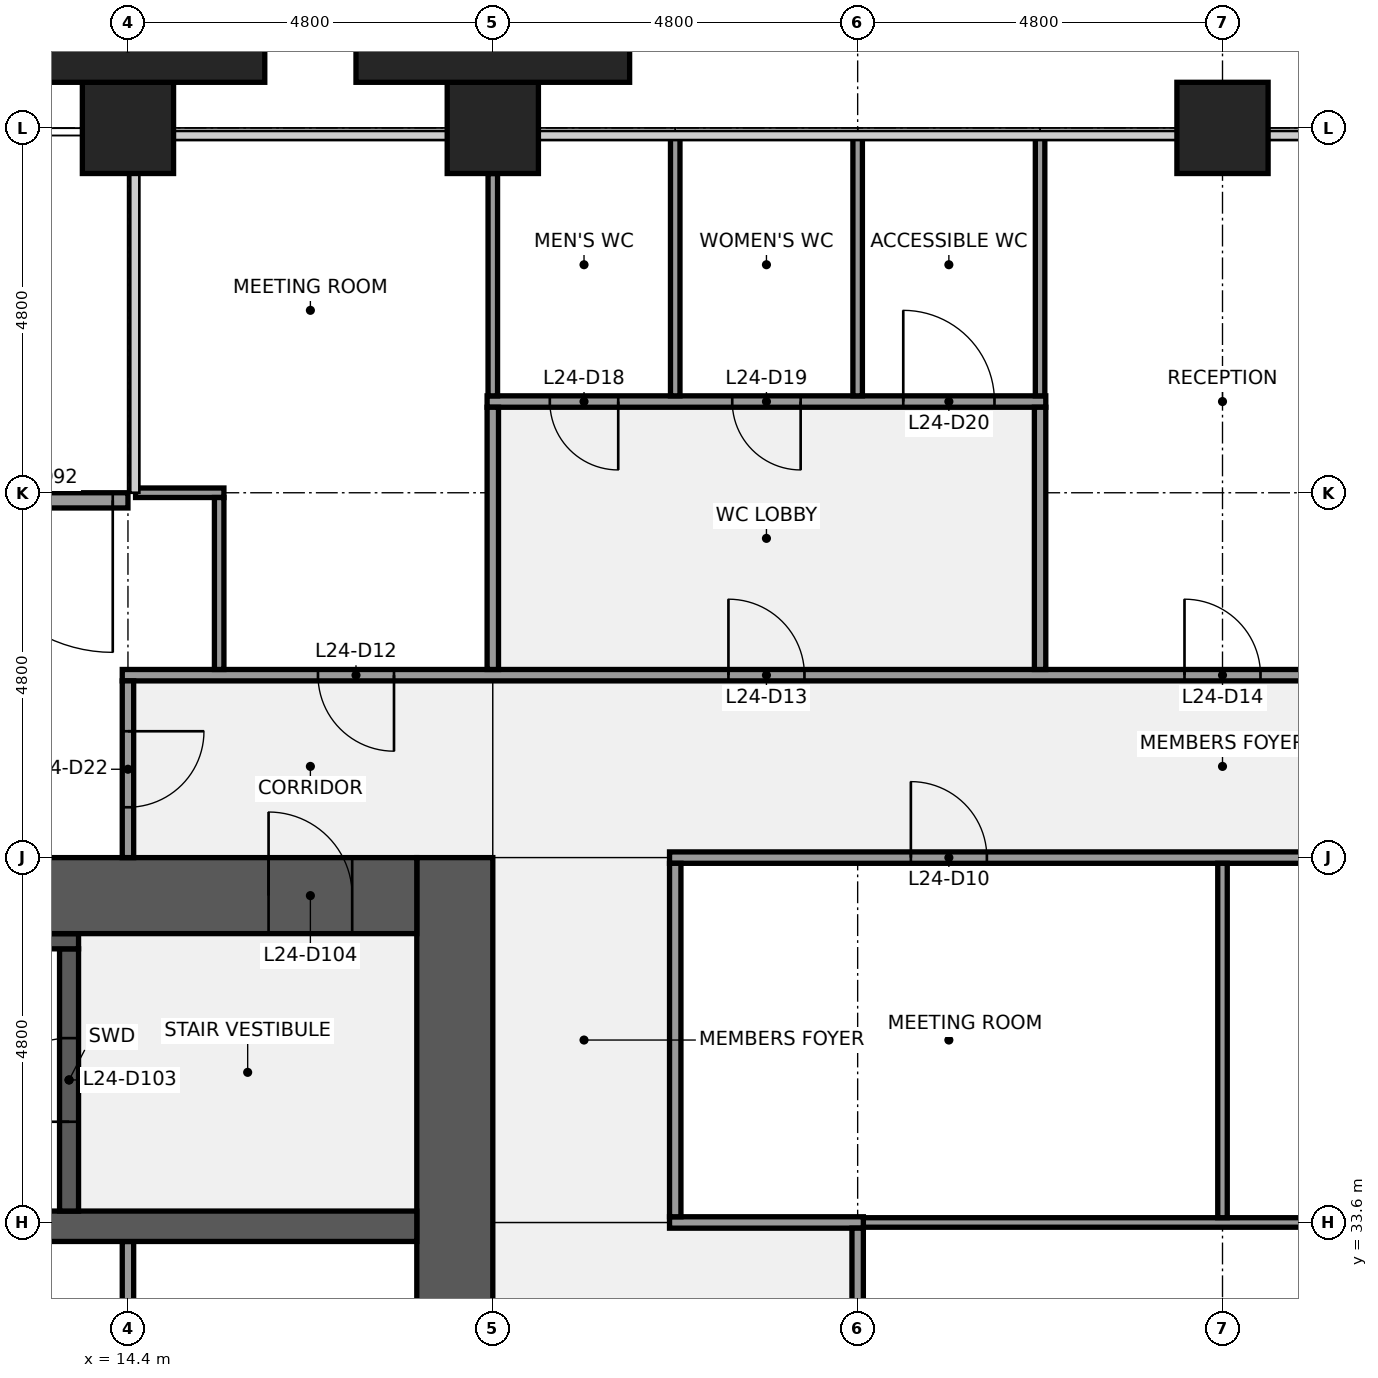
"""IFC4 building model, lengths in metres.
Left out: names, types, materials, properties, quantities, classifications, styles, units other than length and angle.
Written with IfcOpenShell. Run it as: python <this file> out.ifc"""

import sys

from ifc_helpers import new_model, si_unit, direction, frame, frame_2d, origin, origin_2d, place, context, subcontext, project, spatial, rectangle, extrude, element, fill, save


model = new_model("IFC4")
c1 = context("Model", 3, precision=1e-05, world=origin(), true_north=direction((0.0, 1.0)))
c2 = subcontext(c1, "Body", "Model", "MODEL_VIEW")
j1 = project(units=[si_unit("LENGTHUNIT", "METRE"), si_unit("PLANEANGLEUNIT", "RADIAN")], contexts=[c1])
p1 = place(None, origin())
s1 = spatial("IfcSite", under=j1, at=p1, CompositionType="ELEMENT")
p2 = place(p1, origin())
s2 = spatial("IfcBuilding", under=s1, at=p2, CompositionType="ELEMENT")
p3 = place(p2, frame((0.0, 0.0, 116.1)))
s3 = spatial("IfcBuildingStorey", under=s2, at=p3, CompositionType="ELEMENT", Elevation=116.1)
for number, where, z_axis, x_axis in (
    (1, (14.4, 48.0, 0.0), (0.0, 0.0, 1.0), (1.0, 0.0, 0.0)),
    (2, (19.2, 48.0, 0.0), (0.0, 0.0, 1.0), (1.0, 0.0, 0.0)),
    (3, (28.8, 48.0, 0.0), (0.0, 0.0, 1.0), (1.0, 0.0, 0.0)),
):
    element("IfcColumn", number, at=place(p3, frame(where, z_axis=z_axis, x_axis=x_axis)), inside=s3, PredefinedType="COLUMN", context=c2, shape_type="SweptSolid", body=[
        extrude(rectangle(XDim=1.2, YDim=1.2, at=origin_2d()), origin(), (0.0, 0.0, 1.0), 4.0),
    ])
p4 = place(p3, frame((18.7, 38.4, 0.0), z_axis=(0.0, 0.0, 1.0), x_axis=(0.0, -1.0, 0.0)))
e4 = element("IfcWall", 4, at=p4, inside=s3, PredefinedType="SHEAR", context=c2, shape_type="SweptSolid", body=[
    extrude(rectangle(XDim=28.8, YDim=1.0, at=frame_2d((14.4, 0.0))), origin(), (0.0, 0.0, 1.0), 3.84),
])
p5 = place(p4, frame((18.3, 0.0, 0.0)))
e5 = element("IfcOpeningElement", 5, at=p5, cuts=e4, PredefinedType="OPENING", context=c2, shape_type="SweptSolid", body=[
    extrude(rectangle(XDim=1.8, YDim=2.1, at=frame_2d((0.9, 1.05))), frame((0.0, 0.51, 0.0), z_axis=(0.0, -1.0, 0.0), x_axis=(1.0, 0.0, 0.0)), (0.0, 0.0, 1.0), 1.02),
])
p6 = place(p4, frame((8.7, 0.0, 0.0)))
e6 = element("IfcOpeningElement", 6, at=p6, cuts=e4, PredefinedType="OPENING", context=c2, shape_type="SweptSolid", body=[
    extrude(rectangle(XDim=1.8, YDim=2.1, at=frame_2d((0.9, 1.05))), frame((0.0, 0.51, 0.0), z_axis=(0.0, -1.0, 0.0), x_axis=(1.0, 0.0, 0.0)), (0.0, 0.0, 1.0), 1.02),
])
p7 = place(p3, frame((14.4, 30.75, 0.0), z_axis=(0.0, 0.0, 1.0), x_axis=(0.0, 1.0, 0.0)))
e7 = element("IfcWall", 7, at=p7, inside=s3, PredefinedType="PARTITIONING", context=c2, shape_type="SweptSolid", body=[
    extrude(rectangle(XDim=2.6, YDim=0.15, at=frame_2d((1.3, 0.0))), origin(), (0.0, 0.0, 1.0), 3.84),
])
p8 = place(p3, frame((1.0, 33.55, 0.0), z_axis=(0.0, 0.0, 1.0), x_axis=(1.0, 0.0, 0.0)))
e8 = element("IfcWall", 8, at=p8, inside=s3, PredefinedType="SHEAR", context=c2, shape_type="SweptSolid", body=[
    extrude(rectangle(XDim=17.2, YDim=0.4, at=frame_2d((8.6, 0.0))), origin(), (0.0, 0.0, 1.0), 3.84),
])
p9 = place(p3, frame((13.625, 33.75, 0.0), z_axis=(0.0, 0.0, 1.0), x_axis=(0.0, 1.0, 0.0)))
e9 = element("IfcWall", 9, at=p9, inside=s3, PredefinedType="SHEAR", context=c2, shape_type="SweptSolid", body=[
    extrude(rectangle(XDim=3.45, YDim=0.25, at=frame_2d((1.725, 0.0))), origin(), (0.0, 0.0, 1.0), 3.84),
])
p10 = place(p9, frame((1.175, 0.0, 0.0)))
e10 = element("IfcOpeningElement", 10, at=p10, cuts=e9, PredefinedType="OPENING", context=c2, shape_type="SweptSolid", body=[
    extrude(rectangle(XDim=1.1, YDim=2.1, at=frame_2d((0.55, 1.05))), frame((0.0, 0.135, 0.0), z_axis=(0.0, -1.0, 0.0), x_axis=(1.0, 0.0, 0.0)), (0.0, 0.0, 1.0), 0.27),
])
p11 = place(p3, frame((6.25, 37.3, 0.0), z_axis=(0.0, 0.0, 1.0), x_axis=(1.0, 0.0, 0.0)))
e11 = element("IfcWall", 11, at=p11, inside=s3, PredefinedType="SHEAR", context=c2, shape_type="SweptSolid", body=[
    extrude(rectangle(XDim=7.5, YDim=0.2, at=frame_2d((3.75, 0.0))), origin(), (0.0, 0.0, 1.0), 3.84),
])
p12 = place(p3, frame((4.8, 37.9, 0.0), z_axis=(0.0, 0.0, 1.0), x_axis=(1.0, 0.0, 0.0)))
e12 = element("IfcWall", 12, at=p12, inside=s3, PredefinedType="SHEAR", context=c2, shape_type="SweptSolid", body=[
    extrude(rectangle(XDim=13.4, YDim=1.0, at=frame_2d((6.7, 0.0))), origin(), (0.0, 0.0, 1.0), 3.84),
])
p13 = place(p12, frame((11.45, 0.0, 0.0)))
e13 = element("IfcOpeningElement", 13, at=p13, cuts=e12, PredefinedType="OPENING", context=c2, shape_type="SweptSolid", body=[
    extrude(rectangle(XDim=1.1, YDim=2.1, at=frame_2d((0.55, 1.05))), frame((0.0, 0.51, 0.0), z_axis=(0.0, -1.0, 0.0), x_axis=(1.0, 0.0, 0.0)), (0.0, 0.0, 1.0), 1.02),
])
p14 = place(p3, frame((24.075, 33.6, 0.0), z_axis=(0.0, 0.0, 1.0), x_axis=(1.0, 0.0, 0.0)))
e14 = element("IfcWall", 14, at=p14, inside=s3, PredefinedType="PARTITIONING", context=c2, shape_type="SweptSolid", body=[
    extrude(rectangle(XDim=9.6, YDim=0.125, at=frame_2d((4.8, 0.0))), origin(), (0.0, 0.0, 1.0), 2.936),
])
p15 = place(p3, frame((21.525, 33.6, 0.0), z_axis=(0.0, 0.0, 1.0), x_axis=(1.0, 0.0, 0.0)))
e15 = element("IfcWall", 15, at=p15, inside=s3, PredefinedType="PARTITIONING", context=c2, shape_type="SweptSolid", body=[
    extrude(rectangle(XDim=2.55, YDim=0.15, at=frame_2d((1.275, 0.0))), origin(), (0.0, 0.0, 1.0), 2.936),
])
p16 = place(p3, frame((21.525, 38.4, 0.0), z_axis=(0.0, 0.0, 1.0), x_axis=(1.0, 0.0, 0.0)))
e16 = element("IfcWall", 16, at=p16, inside=s3, PredefinedType="PARTITIONING", context=c2, shape_type="SweptSolid", body=[
    extrude(rectangle(XDim=14.55, YDim=0.15, at=frame_2d((7.275, 0.0))), origin(), (0.0, 0.0, 1.0), 2.936),
])
p17 = place(p16, frame((3.175, 0.0, 0.0)))
e17 = element("IfcOpeningElement", 17, at=p17, cuts=e16, PredefinedType="OPENING", context=c2, shape_type="SweptSolid", body=[
    extrude(rectangle(XDim=1.0, YDim=2.1, at=frame_2d((0.5, 1.05))), frame((0.0, 0.085, 0.0), z_axis=(0.0, -1.0, 0.0), x_axis=(1.0, 0.0, 0.0)), (0.0, 0.0, 1.0), 0.17),
])
p18 = place(p16, frame((10.375, 0.0, 0.0)))
e18 = element("IfcOpeningElement", 18, at=p18, cuts=e16, PredefinedType="OPENING", context=c2, shape_type="SweptSolid", body=[
    extrude(rectangle(XDim=1.0, YDim=2.1, at=frame_2d((0.5, 1.05))), frame((0.0, 0.085, 0.0), z_axis=(0.0, -1.0, 0.0), x_axis=(1.0, 0.0, 0.0)), (0.0, 0.0, 1.0), 0.17),
])
p19 = place(p3, frame((14.325, 40.8, 0.0), z_axis=(0.0, 0.0, 1.0), x_axis=(1.0, 0.0, 0.0)))
e19 = element("IfcWall", 19, at=p19, inside=s3, PredefinedType="PARTITIONING", context=c2, shape_type="SweptSolid", body=[
    extrude(rectangle(XDim=28.95, YDim=0.15, at=frame_2d((14.475, 0.0))), origin(), (0.0, 0.0, 1.0), 2.936),
])
p20 = place(p19, frame((2.575, 0.0, 0.0)))
e20 = element("IfcOpeningElement", 20, at=p20, cuts=e19, PredefinedType="OPENING", context=c2, shape_type="SweptSolid", body=[
    extrude(rectangle(XDim=1.0, YDim=2.1, at=frame_2d((0.5, 1.05))), frame((0.0, 0.085, 0.0), z_axis=(0.0, -1.0, 0.0), x_axis=(1.0, 0.0, 0.0)), (0.0, 0.0, 1.0), 0.17),
])
p21 = place(p19, frame((7.975, 0.0, 0.0)))
e21 = element("IfcOpeningElement", 21, at=p21, cuts=e19, PredefinedType="OPENING", context=c2, shape_type="SweptSolid", body=[
    extrude(rectangle(XDim=1.0, YDim=2.1, at=frame_2d((0.5, 1.05))), frame((0.0, 0.085, 0.0), z_axis=(0.0, -1.0, 0.0), x_axis=(1.0, 0.0, 0.0)), (0.0, 0.0, 1.0), 0.17),
])
p22 = place(p19, frame((13.975, 0.0, 0.0)))
e22 = element("IfcOpeningElement", 22, at=p22, cuts=e19, PredefinedType="OPENING", context=c2, shape_type="SweptSolid", body=[
    extrude(rectangle(XDim=1.0, YDim=2.1, at=frame_2d((0.5, 1.05))), frame((0.0, 0.085, 0.0), z_axis=(0.0, -1.0, 0.0), x_axis=(1.0, 0.0, 0.0)), (0.0, 0.0, 1.0), 0.17),
])
p23 = place(p19, frame((18.775, 0.0, 0.0)))
e23 = element("IfcOpeningElement", 23, at=p23, cuts=e19, PredefinedType="OPENING", context=c2, shape_type="SweptSolid", body=[
    extrude(rectangle(XDim=1.0, YDim=2.1, at=frame_2d((0.5, 1.05))), frame((0.0, 0.085, 0.0), z_axis=(0.0, -1.0, 0.0), x_axis=(1.0, 0.0, 0.0)), (0.0, 0.0, 1.0), 0.17),
])
p24 = place(p19, frame((22.375, 0.0, 0.0)))
e24 = element("IfcOpeningElement", 24, at=p24, cuts=e19, PredefinedType="OPENING", context=c2, shape_type="SweptSolid", body=[
    extrude(rectangle(XDim=1.0, YDim=2.1, at=frame_2d((0.5, 1.05))), frame((0.0, 0.085, 0.0), z_axis=(0.0, -1.0, 0.0), x_axis=(1.0, 0.0, 0.0)), (0.0, 0.0, 1.0), 0.17),
])
p25 = place(p19, frame((25.975, 0.0, 0.0)))
e25 = element("IfcOpeningElement", 25, at=p25, cuts=e19, PredefinedType="OPENING", context=c2, shape_type="SweptSolid", body=[
    extrude(rectangle(XDim=1.0, YDim=2.1, at=frame_2d((0.5, 1.05))), frame((0.0, 0.085, 0.0), z_axis=(0.0, -1.0, 0.0), x_axis=(1.0, 0.0, 0.0)), (0.0, 0.0, 1.0), 0.17),
])
p26 = place(p3, frame((14.5, 43.2, 0.0), z_axis=(0.0, 0.0, 1.0), x_axis=(1.0, 0.0, 0.0)))
e26 = element("IfcWall", 26, at=p26, inside=s3, PredefinedType="PARTITIONING", context=c2, shape_type="SweptSolid", body=[
    extrude(rectangle(XDim=1.163, YDim=0.125, at=frame_2d((0.581, 0.0))), origin(), (0.0, 0.0, 1.0), 2.936),
])
p27 = place(p3, frame((19.125, 44.4, 0.0), z_axis=(0.0, 0.0, 1.0), x_axis=(1.0, 0.0, 0.0)))
e27 = element("IfcWall", 27, at=p27, inside=s3, PredefinedType="PARTITIONING", context=c2, shape_type="SweptSolid", body=[
    extrude(rectangle(XDim=7.35, YDim=0.15, at=frame_2d((3.675, 0.0))), origin(), (0.0, 0.0, 1.0), 2.936),
])
p28 = place(p27, frame((0.825, 0.0, 0.0)))
e28 = element("IfcOpeningElement", 28, at=p28, cuts=e27, PredefinedType="OPENING", context=c2, shape_type="SweptSolid", body=[
    extrude(rectangle(XDim=0.9, YDim=2.1, at=frame_2d((0.45, 1.05))), frame((0.0, 0.085, 0.0), z_axis=(0.0, -1.0, 0.0), x_axis=(1.0, 0.0, 0.0)), (0.0, 0.0, 1.0), 0.17),
])
p29 = place(p27, frame((3.225, 0.0, 0.0)))
e29 = element("IfcOpeningElement", 29, at=p29, cuts=e27, PredefinedType="OPENING", context=c2, shape_type="SweptSolid", body=[
    extrude(rectangle(XDim=0.9, YDim=2.1, at=frame_2d((0.45, 1.05))), frame((0.0, 0.085, 0.0), z_axis=(0.0, -1.0, 0.0), x_axis=(1.0, 0.0, 0.0)), (0.0, 0.0, 1.0), 0.17),
])
p30 = place(p27, frame((5.475, 0.0, 0.0)))
e30 = element("IfcOpeningElement", 30, at=p30, cuts=e27, PredefinedType="OPENING", context=c2, shape_type="SweptSolid", body=[
    extrude(rectangle(XDim=1.2, YDim=2.1, at=frame_2d((0.6, 1.05))), frame((0.0, 0.085, 0.0), z_axis=(0.0, -1.0, 0.0), x_axis=(1.0, 0.0, 0.0)), (0.0, 0.0, 1.0), 0.17),
])
p31 = place(p3, frame((14.4, 38.4, 0.0), z_axis=(0.0, 0.0, 1.0), x_axis=(0.0, 1.0, 0.0)))
e31 = element("IfcWall", 31, at=p31, inside=s3, PredefinedType="PARTITIONING", context=c2, shape_type="SweptSolid", body=[
    extrude(rectangle(XDim=2.325, YDim=0.15, at=frame_2d((1.163, 0.0))), origin(), (0.0, 0.0, 1.0), 2.936),
])
p32 = place(p31, frame((0.663, 0.0, 0.0)))
e32 = element("IfcOpeningElement", 32, at=p32, cuts=e31, PredefinedType="OPENING", context=c2, shape_type="SweptSolid", body=[
    extrude(rectangle(XDim=1.0, YDim=2.1, at=frame_2d((0.5, 1.05))), frame((0.0, 0.085, 0.0), z_axis=(0.0, -1.0, 0.0), x_axis=(1.0, 0.0, 0.0)), (0.0, 0.0, 1.0), 0.17),
])
p33 = place(p3, frame((15.6, 40.875, 0.0), z_axis=(0.0, 0.0, 1.0), x_axis=(0.0, 1.0, 0.0)))
e33 = element("IfcWall", 33, at=p33, inside=s3, PredefinedType="PARTITIONING", context=c2, shape_type="SweptSolid", body=[
    extrude(rectangle(XDim=2.262, YDim=0.125, at=frame_2d((1.131, 0.0))), origin(), (0.0, 0.0, 1.0), 2.936),
])
p34 = place(p3, frame((19.2, 44.475, 0.0), z_axis=(0.0, 0.0, 1.0), x_axis=(0.0, 1.0, 0.0)))
e34 = element("IfcWall", 34, at=p34, inside=s3, PredefinedType="PARTITIONING", context=c2, shape_type="SweptSolid", body=[
    extrude(rectangle(XDim=2.925, YDim=0.125, at=frame_2d((1.462, 0.0))), origin(), (0.0, 0.0, 1.0), 2.936),
])
p35 = place(p3, frame((19.2, 40.875, 0.0), z_axis=(0.0, 0.0, 1.0), x_axis=(0.0, 1.0, 0.0)))
e35 = element("IfcWall", 35, at=p35, inside=s3, PredefinedType="PARTITIONING", context=c2, shape_type="SweptSolid", body=[
    extrude(rectangle(XDim=3.45, YDim=0.15, at=frame_2d((1.725, 0.0))), origin(), (0.0, 0.0, 1.0), 2.936),
])
p36 = place(p3, frame((21.6, 44.475, 0.0), z_axis=(0.0, 0.0, 1.0), x_axis=(0.0, 1.0, 0.0)))
e36 = element("IfcWall", 36, at=p36, inside=s3, PredefinedType="PARTITIONING", context=c2, shape_type="SweptSolid", body=[
    extrude(rectangle(XDim=3.425, YDim=0.125, at=frame_2d((1.712, 0.0))), origin(), (0.0, 0.0, 1.0), 2.936),
])
p37 = place(p3, frame((21.6, 33.675, 0.0), z_axis=(0.0, 0.0, 1.0), x_axis=(0.0, 1.0, 0.0)))
e37 = element("IfcWall", 37, at=p37, inside=s3, PredefinedType="PARTITIONING", context=c2, shape_type="SweptSolid", body=[
    extrude(rectangle(XDim=4.65, YDim=0.15, at=frame_2d((2.325, 0.0))), origin(), (0.0, 0.0, 1.0), 2.936),
])
p38 = place(p3, frame((24.0, 44.475, 0.0), z_axis=(0.0, 0.0, 1.0), x_axis=(0.0, 1.0, 0.0)))
e38 = element("IfcWall", 38, at=p38, inside=s3, PredefinedType="PARTITIONING", context=c2, shape_type="SweptSolid", body=[
    extrude(rectangle(XDim=3.425, YDim=0.125, at=frame_2d((1.712, 0.0))), origin(), (0.0, 0.0, 1.0), 2.936),
])
p39 = place(p3, frame((24.0, 20.475, 0.0), z_axis=(0.0, 0.0, 1.0), x_axis=(0.0, 1.0, 0.0)))
e39 = element("IfcWall", 39, at=p39, inside=s3, PredefinedType="PARTITIONING", context=c2, shape_type="SweptSolid", body=[
    extrude(rectangle(XDim=13.05, YDim=0.15, at=frame_2d((6.525, 0.0))), origin(), (0.0, 0.0, 1.0), 2.936),
])
p40 = place(p39, frame((6.025, 0.0, 0.0)))
e40 = element("IfcOpeningElement", 40, at=p40, cuts=e39, PredefinedType="OPENING", context=c2, shape_type="SweptSolid", body=[
    extrude(rectangle(XDim=1.0, YDim=2.1, at=frame_2d((0.5, 1.05))), frame((0.0, 0.085, 0.0), z_axis=(0.0, -1.0, 0.0), x_axis=(1.0, 0.0, 0.0)), (0.0, 0.0, 1.0), 0.17),
])
p41 = place(p3, frame((26.4, 44.475, 0.0), z_axis=(0.0, 0.0, 1.0), x_axis=(0.0, 1.0, 0.0)))
e41 = element("IfcWall", 41, at=p41, inside=s3, PredefinedType="PARTITIONING", context=c2, shape_type="SweptSolid", body=[
    extrude(rectangle(XDim=3.425, YDim=0.125, at=frame_2d((1.712, 0.0))), origin(), (0.0, 0.0, 1.0), 2.936),
])
p42 = place(p3, frame((26.4, 40.875, 0.0), z_axis=(0.0, 0.0, 1.0), x_axis=(0.0, 1.0, 0.0)))
e42 = element("IfcWall", 42, at=p42, inside=s3, PredefinedType="PARTITIONING", context=c2, shape_type="SweptSolid", body=[
    extrude(rectangle(XDim=3.45, YDim=0.15, at=frame_2d((1.725, 0.0))), origin(), (0.0, 0.0, 1.0), 2.936),
])
p43 = place(p3, frame((28.8, 33.663, 0.0), z_axis=(0.0, 0.0, 1.0), x_axis=(0.0, 1.0, 0.0)))
e43 = element("IfcWall", 43, at=p43, inside=s3, PredefinedType="PARTITIONING", context=c2, shape_type="SweptSolid", body=[
    extrude(rectangle(XDim=4.662, YDim=0.125, at=frame_2d((2.331, 0.0))), origin(), (0.0, 0.0, 1.0), 2.936),
])
p44 = place(p3, frame((14.4, 43.1, 0.0), z_axis=(0.0, 0.0, 1.0), x_axis=(-1.0, 0.0, 0.0)))
e44 = element("IfcWall", 44, at=p44, inside=s3, PredefinedType="SOLIDWALL", context=c2, shape_type="SweptSolid", body=[
    extrude(rectangle(XDim=2.4, YDim=0.2, at=frame_2d((1.2, 0.0))), origin(), (0.0, 0.0, 1.0), 3.296),
])
p45 = place(p44, frame((0.2, 0.0, 0.0)))
e45 = element("IfcOpeningElement", 45, at=p45, cuts=e44, PredefinedType="OPENING", context=c2, shape_type="SweptSolid", body=[
    extrude(rectangle(XDim=2.0, YDim=2.1, at=frame_2d((1.0, 1.05))), frame((0.0, 0.11, 0.0), z_axis=(0.0, -1.0, 0.0), x_axis=(1.0, 0.0, 0.0)), (0.0, 0.0, 1.0), 0.22),
])
for number, where, z_axis, x_axis in (
    (46, (14.4, 49.05, 0.0), (0.0, 0.0, 1.0), (1.0, 0.0, 0.0)),
    (47, (19.2, 49.05, 0.0), (0.0, 0.0, 1.0), (1.0, 0.0, 0.0)),
):
    element("IfcColumn", number, at=place(p3, frame(where, z_axis=z_axis, x_axis=x_axis)), inside=s3, PredefinedType="PILASTER", context=c2, shape_type="SweptSolid", body=[
        extrude(rectangle(XDim=3.6, YDim=0.9, at=origin_2d()), origin(), (0.0, 0.0, 1.0), 4.0),
    ])
p46 = place(p10, origin())
e48 = element("IfcDoor", 48, at=p46, inside=s3, OperationType="SINGLE_SWING_LEFT", PredefinedType="DOOR", context=c2, shape_type="SweptSolid", body=[
    extrude(rectangle(XDim=1.1, YDim=2.1, at=frame_2d((0.55, 1.05))), frame((0.0, 0.025, 0.0), z_axis=(0.0, -1.0, 0.0), x_axis=(1.0, 0.0, 0.0)), (0.0, 0.0, 1.0), 0.05),
])
fill(e10, e48)
p47 = place(p13, origin())
e49 = element("IfcDoor", 49, at=p47, inside=s3, OperationType="SINGLE_SWING_LEFT", PredefinedType="DOOR", context=c2, shape_type="SweptSolid", body=[
    extrude(rectangle(XDim=1.1, YDim=2.1, at=frame_2d((0.55, 1.05))), frame((0.0, 0.025, 0.0), z_axis=(0.0, -1.0, 0.0), x_axis=(1.0, 0.0, 0.0)), (0.0, 0.0, 1.0), 0.05),
])
fill(e13, e49)
p48 = place(p17, origin())
e50 = element("IfcDoor", 50, at=p48, inside=s3, OperationType="SINGLE_SWING_LEFT", PredefinedType="DOOR", context=c2, shape_type="SweptSolid", body=[
    extrude(rectangle(XDim=1.0, YDim=2.1, at=frame_2d((0.5, 1.05))), frame((0.0, 0.025, 0.0), z_axis=(0.0, -1.0, 0.0), x_axis=(1.0, 0.0, 0.0)), (0.0, 0.0, 1.0), 0.05),
])
fill(e17, e50)
p49 = place(p20, origin())
e51 = element("IfcDoor", 51, at=p49, inside=s3, OperationType="SINGLE_SWING_RIGHT", PredefinedType="DOOR", context=c2, shape_type="SweptSolid", body=[
    extrude(rectangle(XDim=1.0, YDim=2.1, at=frame_2d((0.5, 1.05))), frame((0.0, 0.025, 0.0), z_axis=(0.0, -1.0, 0.0), x_axis=(1.0, 0.0, 0.0)), (0.0, 0.0, 1.0), 0.05),
])
fill(e20, e51)
p50 = place(p21, origin())
e52 = element("IfcDoor", 52, at=p50, inside=s3, OperationType="SINGLE_SWING_LEFT", PredefinedType="DOOR", context=c2, shape_type="SweptSolid", body=[
    extrude(rectangle(XDim=1.0, YDim=2.1, at=frame_2d((0.5, 1.05))), frame((0.0, 0.025, 0.0), z_axis=(0.0, -1.0, 0.0), x_axis=(1.0, 0.0, 0.0)), (0.0, 0.0, 1.0), 0.05),
])
fill(e21, e52)
p51 = place(p22, origin())
e53 = element("IfcDoor", 53, at=p51, inside=s3, OperationType="SINGLE_SWING_LEFT", PredefinedType="DOOR", context=c2, shape_type="SweptSolid", body=[
    extrude(rectangle(XDim=1.0, YDim=2.1, at=frame_2d((0.5, 1.05))), frame((0.0, 0.025, 0.0), z_axis=(0.0, -1.0, 0.0), x_axis=(1.0, 0.0, 0.0)), (0.0, 0.0, 1.0), 0.05),
])
fill(e22, e53)
p52 = place(p28, origin())
e54 = element("IfcDoor", 54, at=p52, inside=s3, OperationType="SINGLE_SWING_RIGHT", PredefinedType="DOOR", context=c2, shape_type="SweptSolid", body=[
    extrude(rectangle(XDim=0.9, YDim=2.1, at=frame_2d((0.45, 1.05))), frame((0.0, 0.025, 0.0), z_axis=(0.0, -1.0, 0.0), x_axis=(1.0, 0.0, 0.0)), (0.0, 0.0, 1.0), 0.05),
])
fill(e28, e54)
p53 = place(p29, origin())
e55 = element("IfcDoor", 55, at=p53, inside=s3, OperationType="SINGLE_SWING_RIGHT", PredefinedType="DOOR", context=c2, shape_type="SweptSolid", body=[
    extrude(rectangle(XDim=0.9, YDim=2.1, at=frame_2d((0.45, 1.05))), frame((0.0, 0.025, 0.0), z_axis=(0.0, -1.0, 0.0), x_axis=(1.0, 0.0, 0.0)), (0.0, 0.0, 1.0), 0.05),
])
fill(e29, e55)
p54 = place(p30, origin())
e56 = element("IfcDoor", 56, at=p54, inside=s3, OperationType="SINGLE_SWING_LEFT", PredefinedType="DOOR", context=c2, shape_type="SweptSolid", body=[
    extrude(rectangle(XDim=1.2, YDim=2.1, at=frame_2d((0.6, 1.05))), frame((0.0, 0.025, 0.0), z_axis=(0.0, -1.0, 0.0), x_axis=(1.0, 0.0, 0.0)), (0.0, 0.0, 1.0), 0.05),
])
fill(e30, e56)
p55 = place(p32, origin())
e57 = element("IfcDoor", 57, at=p55, inside=s3, OperationType="SINGLE_SWING_RIGHT", PredefinedType="DOOR", context=c2, shape_type="SweptSolid", body=[
    extrude(rectangle(XDim=1.0, YDim=2.1, at=frame_2d((0.5, 1.05))), frame((0.0, 0.025, 0.0), z_axis=(0.0, -1.0, 0.0), x_axis=(1.0, 0.0, 0.0)), (0.0, 0.0, 1.0), 0.05),
])
fill(e32, e57)
p56 = place(p45, origin())
e58 = element("IfcDoor", 58, at=p56, inside=s3, OperationType="SINGLE_SWING_LEFT", PredefinedType="DOOR", context=c2, shape_type="SweptSolid", body=[
    extrude(rectangle(XDim=2.0, YDim=2.1, at=frame_2d((1.0, 1.05))), frame((0.0, 0.025, 0.0), z_axis=(0.0, -1.0, 0.0), x_axis=(1.0, 0.0, 0.0)), (0.0, 0.0, 1.0), 0.05),
])
fill(e45, e58)
save(model, sys.argv[1])
